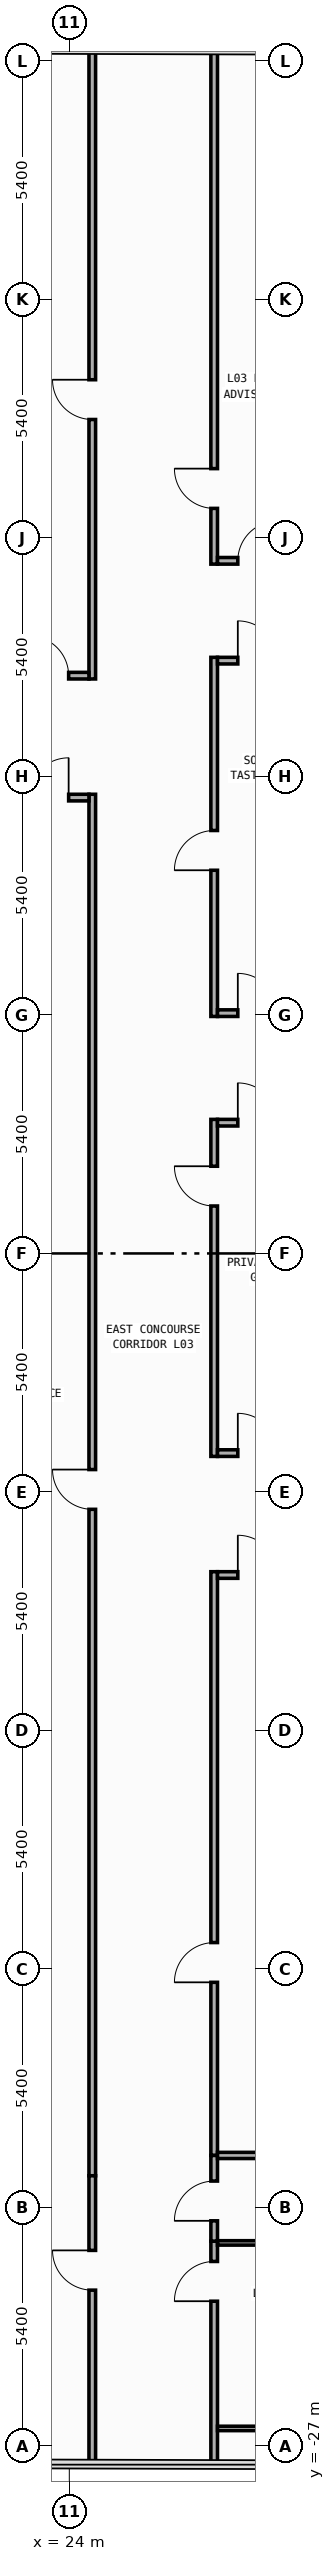
"""IFC4 building model, lengths in metres.
Left out: names, types, materials, properties, quantities, classifications, styles, units other than length and angle.
Written with IfcOpenShell. Run it as: python <this file> out.ifc"""

import sys

from ifc_helpers import new_model, si_unit, direction, frame, frame_2d, origin, place, context, subcontext, project, spatial, rectangle, extrude, element, fill, save


model = new_model("IFC4")
c1 = context("Model", 3, precision=1e-05, world=origin(), true_north=direction((0.0, 1.0)))
c2 = subcontext(c1, "Body", "Model", "MODEL_VIEW")
j1 = project(units=[si_unit("LENGTHUNIT", "METRE"), si_unit("PLANEANGLEUNIT", "RADIAN")], contexts=[c1])
p1 = place(None, origin())
s1 = spatial("IfcSite", under=j1, at=p1, CompositionType="ELEMENT")
p2 = place(p1, origin())
s2 = spatial("IfcBuilding", under=s1, at=p2, CompositionType="ELEMENT")
p3 = place(p2, frame((0.0, 0.0, 11.0)))
s3 = spatial("IfcBuildingStorey", under=s2, at=p3, CompositionType="ELEMENT", Elevation=11.0)
p4 = place(p3, frame((27.28, -4.595, 0.0), z_axis=(0.0, 0.0, 1.0), x_axis=(0.0, 1.0, 0.0)))
e1 = element("IfcWall", 1, at=p4, inside=s3, PredefinedType="PARTITIONING", context=c2, shape_type="SweptSolid", body=[
    extrude(rectangle(XDim=7.63, YDim=0.15, at=frame_2d((3.815, 0.0))), origin(), (0.0, 0.0, 1.0), 4.7),
])
p5 = place(p4, frame((5.669, 0.0, 0.0)))
e2 = element("IfcOpeningElement", 2, at=p5, cuts=e1, PredefinedType="OPENING", context=c2, shape_type="SweptSolid", body=[
    extrude(rectangle(XDim=0.9, YDim=2.15, at=frame_2d((0.45, 1.075))), frame((0.0, 0.085, 0.0), z_axis=(0.0, -1.0, 0.0), x_axis=(1.0, 0.0, 0.0)), (0.0, 0.0, 1.0), 0.17),
])
p6 = place(p3, frame((27.28, 5.365, 0.0), z_axis=(0.0, 0.0, 1.0), x_axis=(0.0, 1.0, 0.0)))
e3 = element("IfcWall", 3, at=p6, inside=s3, PredefinedType="PARTITIONING", context=c2, shape_type="SweptSolid", body=[
    extrude(rectangle(XDim=8.13, YDim=0.15, at=frame_2d((4.065, 0.0))), origin(), (0.0, 0.0, 1.0), 4.7),
])
p7 = place(p6, frame((3.31, 0.0, 0.0)))
e4 = element("IfcOpeningElement", 4, at=p7, cuts=e3, PredefinedType="OPENING", context=c2, shape_type="SweptSolid", body=[
    extrude(rectangle(XDim=0.9, YDim=2.15, at=frame_2d((0.45, 1.075))), frame((0.0, 0.085, 0.0), z_axis=(0.0, -1.0, 0.0), x_axis=(1.0, 0.0, 0.0)), (0.0, 0.0, 1.0), 0.17),
])
p8 = place(p3, frame((24.52, 13.005, 0.0), z_axis=(0.0, 0.0, 1.0), x_axis=(0.0, 1.0, 0.0)))
e5 = element("IfcWall", 5, at=p8, inside=s3, PredefinedType="PARTITIONING", context=c2, shape_type="SweptSolid", body=[
    extrude(rectangle(XDim=14.253, YDim=0.15, at=frame_2d((7.126, 0.0))), origin(), (0.0, 0.0, 1.0), 4.7),
])
p9 = place(p8, frame((5.874, 0.0, 0.0)))
e6 = element("IfcOpeningElement", 6, at=p9, cuts=e5, PredefinedType="OPENING", context=c2, shape_type="SweptSolid", body=[
    extrude(rectangle(XDim=0.9, YDim=2.15, at=frame_2d((0.45, 1.075))), frame((0.0, 0.085, 0.0), z_axis=(0.0, -1.0, 0.0), x_axis=(1.0, 0.0, 0.0)), (0.0, 0.0, 1.0), 0.17),
])
p10 = place(p3, frame((27.28, -27.421, 0.0), z_axis=(0.0, 0.0, 1.0), x_axis=(0.0, 1.0, 0.0)))
e7 = element("IfcWall", 7, at=p10, inside=s3, PredefinedType="PARTITIONING", context=c2, shape_type="SweptSolid", body=[
    extrude(rectangle(XDim=5.061, YDim=0.15, at=frame_2d((2.531, 0.0))), origin(), (0.0, 0.0, 1.0), 4.7),
])
p11 = place(p10, frame((3.701, 0.0, 0.0)))
e8 = element("IfcOpeningElement", 8, at=p11, cuts=e7, PredefinedType="OPENING", context=c2, shape_type="SweptSolid", body=[
    extrude(rectangle(XDim=0.9, YDim=2.15, at=frame_2d((0.45, 1.075))), frame((0.0, 0.085, 0.0), z_axis=(0.0, -1.0, 0.0), x_axis=(1.0, 0.0, 0.0)), (0.0, 0.0, 1.0), 0.17),
])
p12 = place(p3, frame((24.52, -20.88, 0.0), z_axis=(0.0, 0.0, 1.0), x_axis=(0.0, 1.0, 0.0)))
e9 = element("IfcWall", 9, at=p12, inside=s3, PredefinedType="PARTITIONING", context=c2, shape_type="SweptSolid", body=[
    extrude(rectangle(XDim=31.275, YDim=0.15, at=frame_2d((15.637, 0.0))), origin(), (0.0, 0.0, 1.0), 4.7),
])
p13 = place(p12, frame((15.087, 0.0, 0.0)))
e10 = element("IfcOpeningElement", 10, at=p13, cuts=e9, PredefinedType="OPENING", context=c2, shape_type="SweptSolid", body=[
    extrude(rectangle(XDim=0.9, YDim=2.15, at=frame_2d((0.45, 1.075))), frame((0.0, 0.085, 0.0), z_axis=(0.0, -1.0, 0.0), x_axis=(1.0, 0.0, 0.0)), (0.0, 0.0, 1.0), 0.17),
])
p14 = place(p3, frame((27.28, -20.42, 0.0), z_axis=(0.0, 0.0, 1.0), x_axis=(0.0, 1.0, 0.0)))
e11 = element("IfcWall", 11, at=p14, inside=s3, PredefinedType="PARTITIONING", context=c2, shape_type="SweptSolid", body=[
    extrude(rectangle(XDim=13.215, YDim=0.15, at=frame_2d((6.607, 0.0))), origin(), (0.0, 0.0, 1.0), 4.7),
])
p15 = place(p14, frame((3.919, 0.0, 0.0)))
e12 = element("IfcOpeningElement", 12, at=p15, cuts=e11, PredefinedType="OPENING", context=c2, shape_type="SweptSolid", body=[
    extrude(rectangle(XDim=0.9, YDim=2.15, at=frame_2d((0.45, 1.075))), frame((0.0, 0.085, 0.0), z_axis=(0.0, -1.0, 0.0), x_axis=(1.0, 0.0, 0.0)), (0.0, 0.0, 1.0), 0.17),
])
p16 = place(p3, frame((24.52, -27.413, 0.0), z_axis=(0.0, 0.0, 1.0), x_axis=(0.0, 1.0, 0.0)))
e13 = element("IfcWall", 13, at=p16, inside=s3, PredefinedType="PARTITIONING", context=c2, shape_type="SweptSolid", body=[
    extrude(rectangle(XDim=6.533, YDim=0.15, at=frame_2d((3.266, 0.0))), origin(), (0.0, 0.0, 1.0), 4.7),
])
p17 = place(p16, frame((3.943, 0.0, 0.0)))
e14 = element("IfcOpeningElement", 14, at=p17, cuts=e13, PredefinedType="OPENING", context=c2, shape_type="SweptSolid", body=[
    extrude(rectangle(XDim=0.9, YDim=2.15, at=frame_2d((0.45, 1.075))), frame((0.0, 0.085, 0.0), z_axis=(0.0, -1.0, 0.0), x_axis=(1.0, 0.0, 0.0)), (0.0, 0.0, 1.0), 0.17),
])
p18 = place(p3, frame((27.28, -22.36, 0.0), z_axis=(0.0, 0.0, 1.0), x_axis=(0.0, 1.0, 0.0)))
e15 = element("IfcWall", 15, at=p18, inside=s3, PredefinedType="PARTITIONING", context=c2, shape_type="SweptSolid", body=[
    extrude(rectangle(XDim=1.94, YDim=0.15, at=frame_2d((0.97, 0.0))), origin(), (0.0, 0.0, 1.0), 4.7),
])
p19 = place(p18, frame((0.46, 0.0, 0.0)))
e16 = element("IfcOpeningElement", 16, at=p19, cuts=e15, PredefinedType="OPENING", context=c2, shape_type="SweptSolid", body=[
    extrude(rectangle(XDim=0.9, YDim=2.15, at=frame_2d((0.45, 1.075))), frame((0.0, 0.085, 0.0), z_axis=(0.0, -1.0, 0.0), x_axis=(1.0, 0.0, 0.0)), (0.0, 0.0, 1.0), 0.17),
])
p20 = place(p3, frame((27.28, 15.605, 0.0), z_axis=(0.0, 0.0, 1.0), x_axis=(0.0, 1.0, 0.0)))
e17 = element("IfcWall", 17, at=p20, inside=s3, PredefinedType="PARTITIONING", context=c2, shape_type="SweptSolid", body=[
    extrude(rectangle(XDim=11.644, YDim=0.15, at=frame_2d((5.822, 0.0))), origin(), (0.0, 0.0, 1.0), 4.7),
])
p21 = place(p20, frame((1.262, 0.0, 0.0)))
e18 = element("IfcOpeningElement", 18, at=p21, cuts=e17, PredefinedType="OPENING", context=c2, shape_type="SweptSolid", body=[
    extrude(rectangle(XDim=0.9, YDim=2.15, at=frame_2d((0.45, 1.075))), frame((0.0, 0.085, 0.0), z_axis=(0.0, -1.0, 0.0), x_axis=(1.0, 0.0, 0.0)), (0.0, 0.0, 1.0), 0.17),
])
p22 = place(p3, frame((27.355, 2.96, 0.0), z_axis=(0.0, 0.0, 1.0), x_axis=(1.0, 0.0, 0.0)))
e19 = element("IfcWall", 19, at=p22, inside=s3, PredefinedType="PARTITIONING", context=c2, shape_type="SweptSolid", body=[
    extrude(rectangle(XDim=2.645, YDim=0.15, at=frame_2d((1.323, 0.0))), origin(), (0.0, 0.0, 1.0), 4.7),
])
p23 = place(p22, frame((0.46, 0.0, 0.0)))
e20 = element("IfcOpeningElement", 20, at=p23, cuts=e19, PredefinedType="OPENING", context=c2, shape_type="SweptSolid", body=[
    extrude(rectangle(XDim=0.9, YDim=2.15, at=frame_2d((0.45, 1.075))), frame((0.0, 0.085, 0.0), z_axis=(0.0, -1.0, 0.0), x_axis=(1.0, 0.0, 0.0)), (0.0, 0.0, 1.0), 0.17),
])
p24 = place(p3, frame((27.355, 5.44, 0.0), z_axis=(0.0, 0.0, 1.0), x_axis=(1.0, 0.0, 0.0)))
e21 = element("IfcWall", 21, at=p24, inside=s3, PredefinedType="PARTITIONING", context=c2, shape_type="SweptSolid", body=[
    extrude(rectangle(XDim=2.645, YDim=0.15, at=frame_2d((1.323, 0.0))), origin(), (0.0, 0.0, 1.0), 3.8),
])
p25 = place(p24, frame((0.46, 0.0, 0.0)))
e22 = element("IfcOpeningElement", 22, at=p25, cuts=e21, PredefinedType="OPENING", context=c2, shape_type="SweptSolid", body=[
    extrude(rectangle(XDim=0.9, YDim=2.15, at=frame_2d((0.45, 1.075))), frame((0.0, 0.085, 0.0), z_axis=(0.0, -1.0, 0.0), x_axis=(1.0, 0.0, 0.0)), (0.0, 0.0, 1.0), 0.17),
])
p26 = place(p3, frame((27.355, 13.42, 0.0), z_axis=(0.0, 0.0, 1.0), x_axis=(1.0, 0.0, 0.0)))
e23 = element("IfcWall", 23, at=p26, inside=s3, PredefinedType="PARTITIONING", context=c2, shape_type="SweptSolid", body=[
    extrude(rectangle(XDim=2.645, YDim=0.15, at=frame_2d((1.323, 0.0))), origin(), (0.0, 0.0, 1.0), 4.7),
])
p27 = place(p26, frame((0.46, 0.0, 0.0)))
e24 = element("IfcOpeningElement", 24, at=p27, cuts=e23, PredefinedType="OPENING", context=c2, shape_type="SweptSolid", body=[
    extrude(rectangle(XDim=0.9, YDim=2.15, at=frame_2d((0.45, 1.075))), frame((0.0, 0.085, 0.0), z_axis=(0.0, -1.0, 0.0), x_axis=(1.0, 0.0, 0.0)), (0.0, 0.0, 1.0), 0.17),
])
p28 = place(p3, frame((27.355, 15.68, 0.0), z_axis=(0.0, 0.0, 1.0), x_axis=(1.0, 0.0, 0.0)))
e25 = element("IfcWall", 25, at=p28, inside=s3, PredefinedType="PARTITIONING", context=c2, shape_type="SweptSolid", body=[
    extrude(rectangle(XDim=2.645, YDim=0.15, at=frame_2d((1.323, 0.0))), origin(), (0.0, 0.0, 1.0), 4.7),
])
p29 = place(p28, frame((0.46, 0.0, 0.0)))
e26 = element("IfcOpeningElement", 26, at=p29, cuts=e25, PredefinedType="OPENING", context=c2, shape_type="SweptSolid", body=[
    extrude(rectangle(XDim=0.9, YDim=2.15, at=frame_2d((0.45, 1.075))), frame((0.0, 0.085, 0.0), z_axis=(0.0, -1.0, 0.0), x_axis=(1.0, 0.0, 0.0)), (0.0, 0.0, 1.0), 0.17),
])
p30 = place(p3, frame((14.28, 13.08, 0.0), z_axis=(0.0, 0.0, 1.0), x_axis=(1.0, 0.0, 0.0)))
e27 = element("IfcWall", 27, at=p30, inside=s3, PredefinedType="PARTITIONING", context=c2, shape_type="SweptSolid", body=[
    extrude(rectangle(XDim=10.165, YDim=0.15, at=frame_2d((5.083, 0.0))), origin(), (0.0, 0.0, 1.0), 4.7),
])
p31 = place(p30, frame((8.805, 0.0, 0.0)))
e28 = element("IfcOpeningElement", 28, at=p31, cuts=e27, PredefinedType="OPENING", context=c2, shape_type="SweptSolid", body=[
    extrude(rectangle(XDim=0.9, YDim=2.15, at=frame_2d((0.45, 1.075))), frame((0.0, 0.085, 0.0), z_axis=(0.0, -1.0, 0.0), x_axis=(1.0, 0.0, 0.0)), (0.0, 0.0, 1.0), 0.17),
])
p32 = place(p3, frame((20.475, 10.32, 0.0), z_axis=(0.0, 0.0, 1.0), x_axis=(1.0, 0.0, 0.0)))
e29 = element("IfcWall", 29, at=p32, inside=s3, PredefinedType="PARTITIONING", context=c2, shape_type="SweptSolid", body=[
    extrude(rectangle(XDim=3.97, YDim=0.15, at=frame_2d((1.985, 0.0))), origin(), (0.0, 0.0, 1.0), 4.7),
])
p33 = place(p32, frame((2.61, 0.0, 0.0)))
e30 = element("IfcOpeningElement", 30, at=p33, cuts=e29, PredefinedType="OPENING", context=c2, shape_type="SweptSolid", body=[
    extrude(rectangle(XDim=0.9, YDim=2.15, at=frame_2d((0.45, 1.075))), frame((0.0, 0.085, 0.0), z_axis=(0.0, -1.0, 0.0), x_axis=(1.0, 0.0, 0.0)), (0.0, 0.0, 1.0), 0.17),
])
p34 = place(p3, frame((27.355, -4.52, 0.0), z_axis=(0.0, 0.0, 1.0), x_axis=(1.0, 0.0, 0.0)))
e31 = element("IfcWall", 31, at=p34, inside=s3, PredefinedType="PARTITIONING", context=c2, shape_type="SweptSolid", body=[
    extrude(rectangle(XDim=2.645, YDim=0.15, at=frame_2d((1.323, 0.0))), origin(), (0.0, 0.0, 1.0), 4.7),
])
p35 = place(p34, frame((0.46, 0.0, 0.0)))
e32 = element("IfcOpeningElement", 32, at=p35, cuts=e31, PredefinedType="OPENING", context=c2, shape_type="SweptSolid", body=[
    extrude(rectangle(XDim=0.9, YDim=2.15, at=frame_2d((0.45, 1.075))), frame((0.0, 0.085, 0.0), z_axis=(0.0, -1.0, 0.0), x_axis=(1.0, 0.0, 0.0)), (0.0, 0.0, 1.0), 0.17),
])
p36 = place(p3, frame((27.355, -7.28, 0.0), z_axis=(0.0, 0.0, 1.0), x_axis=(1.0, 0.0, 0.0)))
e33 = element("IfcWall", 33, at=p36, inside=s3, PredefinedType="PARTITIONING", context=c2, shape_type="SweptSolid", body=[
    extrude(rectangle(XDim=3.605, YDim=0.15, at=frame_2d((1.802, 0.0))), origin(), (0.0, 0.0, 1.0), 4.7),
])
p37 = place(p36, frame((0.46, 0.0, 0.0)))
e34 = element("IfcOpeningElement", 34, at=p37, cuts=e33, PredefinedType="OPENING", context=c2, shape_type="SweptSolid", body=[
    extrude(rectangle(XDim=0.9, YDim=2.15, at=frame_2d((0.45, 1.075))), frame((0.0, 0.085, 0.0), z_axis=(0.0, -1.0, 0.0), x_axis=(1.0, 0.0, 0.0)), (0.0, 0.0, 1.0), 0.17),
])
p38 = place(p3, frame((27.355, -20.42, 0.0), z_axis=(0.0, 0.0, 1.0), x_axis=(1.0, 0.0, 0.0)))
e35 = element("IfcWall", 35, at=p38, inside=s3, PredefinedType="PARTITIONING", context=c2, shape_type="SweptSolid", body=[
    extrude(rectangle(XDim=9.09, YDim=0.14, at=frame_2d((4.545, 0.0))), origin(), (0.0, 0.0, 1.0), 4.7),
])
p39 = place(p3, frame((27.355, -22.4, 0.0), z_axis=(0.0, 0.0, 1.0), x_axis=(1.0, 0.0, 0.0)))
e36 = element("IfcWall", 36, at=p39, inside=s3, PredefinedType="PARTITIONING", context=c2, shape_type="SweptSolid", body=[
    extrude(rectangle(XDim=2.845, YDim=0.1, at=frame_2d((1.422, 0.0))), origin(), (0.0, 0.0, 1.0), 4.7),
])
p40 = place(p3, frame((30.15, -26.6, 0.0), z_axis=(0.0, 0.0, 1.0), x_axis=(-1.0, 0.0, 0.0)))
e37 = element("IfcWall", 37, at=p40, inside=s3, PredefinedType="PARTITIONING", context=c2, shape_type="SweptSolid", body=[
    extrude(rectangle(XDim=2.795, YDim=0.1, at=frame_2d((1.397, 0.0))), origin(), (0.0, 0.0, 1.0), 4.7),
])
p41 = place(p5, origin())
e38 = element("IfcDoor", 38, at=p41, inside=s3, OperationType="SINGLE_SWING_RIGHT", PredefinedType="DOOR", context=c2, shape_type="SweptSolid", body=[
    extrude(rectangle(XDim=0.9, YDim=2.15, at=frame_2d((0.45, 1.075))), frame((0.0, 0.025, 0.0), z_axis=(0.0, -1.0, 0.0), x_axis=(1.0, 0.0, 0.0)), (0.0, 0.0, 1.0), 0.05),
])
fill(e2, e38)
p42 = place(p7, origin())
e39 = element("IfcDoor", 39, at=p42, inside=s3, OperationType="SINGLE_SWING_LEFT", PredefinedType="DOOR", context=c2, shape_type="SweptSolid", body=[
    extrude(rectangle(XDim=0.9, YDim=2.15, at=frame_2d((0.45, 1.075))), frame((0.0, 0.025, 0.0), z_axis=(0.0, -1.0, 0.0), x_axis=(1.0, 0.0, 0.0)), (0.0, 0.0, 1.0), 0.05),
])
fill(e4, e39)
p43 = place(p9, origin())
e40 = element("IfcDoor", 40, at=p43, inside=s3, OperationType="SINGLE_SWING_RIGHT", PredefinedType="DOOR", context=c2, shape_type="SweptSolid", body=[
    extrude(rectangle(XDim=0.9, YDim=2.15, at=frame_2d((0.45, 1.075))), frame((0.0, 0.025, 0.0), z_axis=(0.0, -1.0, 0.0), x_axis=(1.0, 0.0, 0.0)), (0.0, 0.0, 1.0), 0.05),
])
fill(e6, e40)
p44 = place(p11, origin())
e41 = element("IfcDoor", 41, at=p44, inside=s3, OperationType="SINGLE_SWING_LEFT", PredefinedType="DOOR", context=c2, shape_type="SweptSolid", body=[
    extrude(rectangle(XDim=0.9, YDim=2.15, at=frame_2d((0.45, 1.075))), frame((0.0, 0.025, 0.0), z_axis=(0.0, -1.0, 0.0), x_axis=(1.0, 0.0, 0.0)), (0.0, 0.0, 1.0), 0.05),
])
fill(e8, e41)
p45 = place(p13, origin())
e42 = element("IfcDoor", 42, at=p45, inside=s3, OperationType="SINGLE_SWING_RIGHT", PredefinedType="DOOR", context=c2, shape_type="SweptSolid", body=[
    extrude(rectangle(XDim=0.9, YDim=2.15, at=frame_2d((0.45, 1.075))), frame((0.0, 0.025, 0.0), z_axis=(0.0, -1.0, 0.0), x_axis=(1.0, 0.0, 0.0)), (0.0, 0.0, 1.0), 0.05),
])
fill(e10, e42)
p46 = place(p15, origin())
e43 = element("IfcDoor", 43, at=p46, inside=s3, OperationType="SINGLE_SWING_LEFT", PredefinedType="DOOR", context=c2, shape_type="SweptSolid", body=[
    extrude(rectangle(XDim=0.9, YDim=2.15, at=frame_2d((0.45, 1.075))), frame((0.0, 0.025, 0.0), z_axis=(0.0, -1.0, 0.0), x_axis=(1.0, 0.0, 0.0)), (0.0, 0.0, 1.0), 0.05),
])
fill(e12, e43)
p47 = place(p17, origin())
e44 = element("IfcDoor", 44, at=p47, inside=s3, OperationType="SINGLE_SWING_RIGHT", PredefinedType="DOOR", context=c2, shape_type="SweptSolid", body=[
    extrude(rectangle(XDim=0.9, YDim=2.15, at=frame_2d((0.45, 1.075))), frame((0.0, 0.025, 0.0), z_axis=(0.0, -1.0, 0.0), x_axis=(1.0, 0.0, 0.0)), (0.0, 0.0, 1.0), 0.05),
])
fill(e14, e44)
p48 = place(p19, origin())
e45 = element("IfcDoor", 45, at=p48, inside=s3, OperationType="SINGLE_SWING_LEFT", PredefinedType="DOOR", context=c2, shape_type="SweptSolid", body=[
    extrude(rectangle(XDim=0.9, YDim=2.15, at=frame_2d((0.45, 1.075))), frame((0.0, 0.025, 0.0), z_axis=(0.0, -1.0, 0.0), x_axis=(1.0, 0.0, 0.0)), (0.0, 0.0, 1.0), 0.05),
])
fill(e16, e45)
p49 = place(p21, origin())
e46 = element("IfcDoor", 46, at=p49, inside=s3, OperationType="SINGLE_SWING_RIGHT", PredefinedType="DOOR", context=c2, shape_type="SweptSolid", body=[
    extrude(rectangle(XDim=0.9, YDim=2.15, at=frame_2d((0.45, 1.075))), frame((0.0, 0.025, 0.0), z_axis=(0.0, -1.0, 0.0), x_axis=(1.0, 0.0, 0.0)), (0.0, 0.0, 1.0), 0.05),
])
fill(e18, e46)
p50 = place(p23, origin())
e47 = element("IfcDoor", 47, at=p50, inside=s3, OperationType="SINGLE_SWING_LEFT", PredefinedType="DOOR", context=c2, shape_type="SweptSolid", body=[
    extrude(rectangle(XDim=0.9, YDim=2.15, at=frame_2d((0.45, 1.075))), frame((0.0, 0.025, 0.0), z_axis=(0.0, -1.0, 0.0), x_axis=(1.0, 0.0, 0.0)), (0.0, 0.0, 1.0), 0.05),
])
fill(e20, e47)
p51 = place(p25, origin())
e48 = element("IfcDoor", 48, at=p51, inside=s3, OperationType="SINGLE_SWING_LEFT", PredefinedType="DOOR", context=c2, shape_type="SweptSolid", body=[
    extrude(rectangle(XDim=0.9, YDim=2.15, at=frame_2d((0.45, 1.075))), frame((0.0, 0.025, 0.0), z_axis=(0.0, -1.0, 0.0), x_axis=(1.0, 0.0, 0.0)), (0.0, 0.0, 1.0), 0.05),
])
fill(e22, e48)
p52 = place(p27, origin())
e49 = element("IfcDoor", 49, at=p52, inside=s3, OperationType="SINGLE_SWING_LEFT", PredefinedType="DOOR", context=c2, shape_type="SweptSolid", body=[
    extrude(rectangle(XDim=0.9, YDim=2.15, at=frame_2d((0.45, 1.075))), frame((0.0, 0.025, 0.0), z_axis=(0.0, -1.0, 0.0), x_axis=(1.0, 0.0, 0.0)), (0.0, 0.0, 1.0), 0.05),
])
fill(e24, e49)
p53 = place(p29, origin())
e50 = element("IfcDoor", 50, at=p53, inside=s3, OperationType="SINGLE_SWING_RIGHT", PredefinedType="DOOR", context=c2, shape_type="SweptSolid", body=[
    extrude(rectangle(XDim=0.9, YDim=2.15, at=frame_2d((0.45, 1.075))), frame((0.0, 0.025, 0.0), z_axis=(0.0, -1.0, 0.0), x_axis=(1.0, 0.0, 0.0)), (0.0, 0.0, 1.0), 0.05),
])
fill(e26, e50)
p54 = place(p31, origin())
e51 = element("IfcDoor", 51, at=p54, inside=s3, OperationType="SINGLE_SWING_LEFT", PredefinedType="DOOR", context=c2, shape_type="SweptSolid", body=[
    extrude(rectangle(XDim=0.9, YDim=2.15, at=frame_2d((0.45, 1.075))), frame((0.0, 0.025, 0.0), z_axis=(0.0, -1.0, 0.0), x_axis=(1.0, 0.0, 0.0)), (0.0, 0.0, 1.0), 0.05),
])
fill(e28, e51)
p55 = place(p33, origin())
e52 = element("IfcDoor", 52, at=p55, inside=s3, OperationType="SINGLE_SWING_RIGHT", PredefinedType="DOOR", context=c2, shape_type="SweptSolid", body=[
    extrude(rectangle(XDim=0.9, YDim=2.15, at=frame_2d((0.45, 1.075))), frame((0.0, 0.025, 0.0), z_axis=(0.0, -1.0, 0.0), x_axis=(1.0, 0.0, 0.0)), (0.0, 0.0, 1.0), 0.05),
])
fill(e30, e52)
p56 = place(p35, origin())
e53 = element("IfcDoor", 53, at=p56, inside=s3, OperationType="SINGLE_SWING_LEFT", PredefinedType="DOOR", context=c2, shape_type="SweptSolid", body=[
    extrude(rectangle(XDim=0.9, YDim=2.15, at=frame_2d((0.45, 1.075))), frame((0.0, 0.025, 0.0), z_axis=(0.0, -1.0, 0.0), x_axis=(1.0, 0.0, 0.0)), (0.0, 0.0, 1.0), 0.05),
])
fill(e32, e53)
p57 = place(p37, origin())
e54 = element("IfcDoor", 54, at=p57, inside=s3, OperationType="SINGLE_SWING_LEFT", PredefinedType="DOOR", context=c2, shape_type="SweptSolid", body=[
    extrude(rectangle(XDim=0.9, YDim=2.15, at=frame_2d((0.45, 1.075))), frame((0.0, 0.025, 0.0), z_axis=(0.0, -1.0, 0.0), x_axis=(1.0, 0.0, 0.0)), (0.0, 0.0, 1.0), 0.05),
])
fill(e34, e54)
save(model, sys.argv[1])
